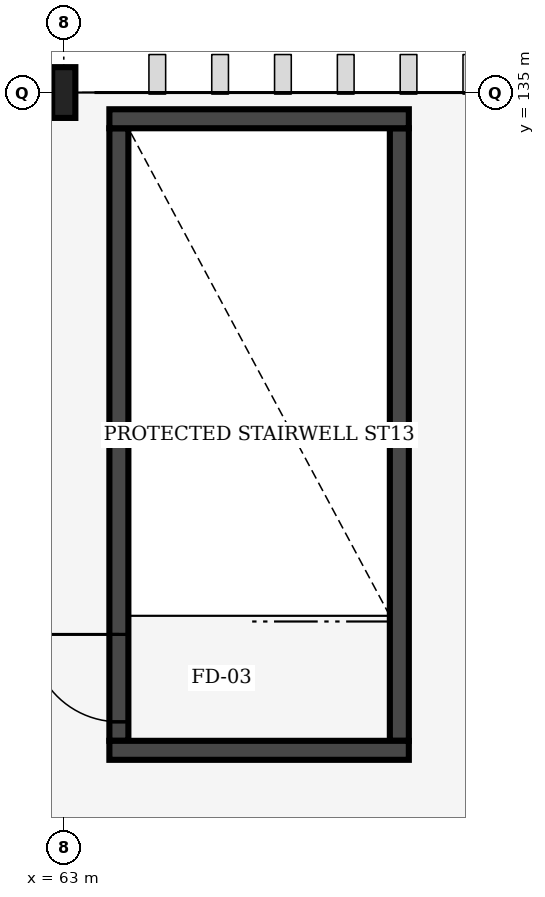
"""IFC4 building model, lengths in metres.
Left out: names, types, materials, properties, quantities, classifications, styles, units other than length and angle.
Written with IfcOpenShell. Run it as: python <this file> out.ifc"""

import sys

from ifc_helpers import new_model, si_unit, direction, frame, frame_2d, origin, origin_2d, place, context, subcontext, project, spatial, rectangle, i_section, extrude, element, fill, save


model = new_model("IFC4")
c1 = context("Model", 3, precision=1e-05, world=origin(), true_north=direction((0.0, 1.0)))
c2 = subcontext(c1, "Body", "Model", "MODEL_VIEW")
j1 = project(units=[si_unit("LENGTHUNIT", "METRE"), si_unit("PLANEANGLEUNIT", "RADIAN")], contexts=[c1])
p1 = place(None, origin())
s1 = spatial("IfcSite", under=j1, at=p1, CompositionType="ELEMENT")
p2 = place(p1, origin())
s2 = spatial("IfcBuilding", under=s1, at=p2, CompositionType="ELEMENT")
p3 = place(p2, frame((0.0, 0.0, 6.0)))
s3 = spatial("IfcBuildingStorey", under=s2, at=p3, CompositionType="ELEMENT", Elevation=6.0)
p4 = place(p3, frame((63.0, 135.0, 0.0), z_axis=(0.0, 0.0, 1.0), x_axis=(1.0, 0.0, 0.0)))
e1 = element("IfcColumn", 1, at=p4, inside=s3, PredefinedType="COLUMN", context=c2, shape_type="SweptSolid", body=[
    extrude(i_section(OverallWidth=0.305, OverallDepth=0.668, WebThickness=0.021, FlangeThickness=0.04, FilletRadius=0.027, at=origin_2d()), origin(), (0.0, 0.0, 1.0), 6.0),
])
p5 = place(p3, frame((63.725, 126.47, 0.0), z_axis=(0.0, 0.0, 1.0), x_axis=(0.0, 1.0, 0.0)))
e2 = element("IfcWall", 2, at=p5, inside=s3, PredefinedType="SHEAR", context=c2, shape_type="SweptSolid", body=[
    extrude(rectangle(XDim=8.06, YDim=0.25, at=frame_2d((4.03, 0.0))), origin(), (0.0, 0.0, 1.0), 5.65),
])
p6 = place(p5, frame((0.25, 0.0, 0.0)))
e3 = element("IfcOpeningElement", 3, at=p6, cuts=e2, PredefinedType="OPENING", context=c2, shape_type="SweptSolid", body=[
    extrude(rectangle(XDim=1.15, YDim=2.15, at=frame_2d((0.575, 1.075))), frame((0.0, 0.135, 0.0), z_axis=(0.0, -1.0, 0.0), x_axis=(1.0, 0.0, 0.0)), (0.0, 0.0, 1.0), 0.27),
])
p7 = place(p3, frame((67.415, 126.47, 0.0), z_axis=(0.0, 0.0, 1.0), x_axis=(0.0, 1.0, 0.0)))
e4 = element("IfcWall", 4, at=p7, inside=s3, PredefinedType="SHEAR", context=c2, shape_type="SweptSolid", body=[
    extrude(rectangle(XDim=8.06, YDim=0.25, at=frame_2d((4.03, 0.0))), origin(), (0.0, 0.0, 1.0), 5.65),
])
for number, where, z_axis, x_axis in (
    (5, (63.6, 126.345, 0.0), (0.0, 0.0, 1.0), (1.0, 0.0, 0.0)),
    (6, (63.6, 134.655, 0.0), (0.0, 0.0, 1.0), (1.0, 0.0, 0.0)),
):
    element("IfcWall", number, at=place(p3, frame(where, z_axis=z_axis, x_axis=x_axis)), inside=s3, PredefinedType="SHEAR", context=c2, shape_type="SweptSolid", body=[
        extrude(rectangle(XDim=3.94, YDim=0.25, at=frame_2d((1.97, 0.0))), origin(), (0.0, 0.0, 1.0), 5.65),
    ])
p8 = place(p6, origin())
e7 = element("IfcDoor", 7, at=p8, inside=s3, OperationType="SINGLE_SWING_RIGHT", PredefinedType="DOOR", context=c2, shape_type="SweptSolid", body=[
    extrude(rectangle(XDim=1.15, YDim=2.15, at=frame_2d((0.575, 1.075))), frame((0.0, 0.025, 0.0), z_axis=(0.0, -1.0, 0.0), x_axis=(1.0, 0.0, 0.0)), (0.0, 0.0, 1.0), 0.05),
])
fill(e3, e7)
save(model, sys.argv[1])
